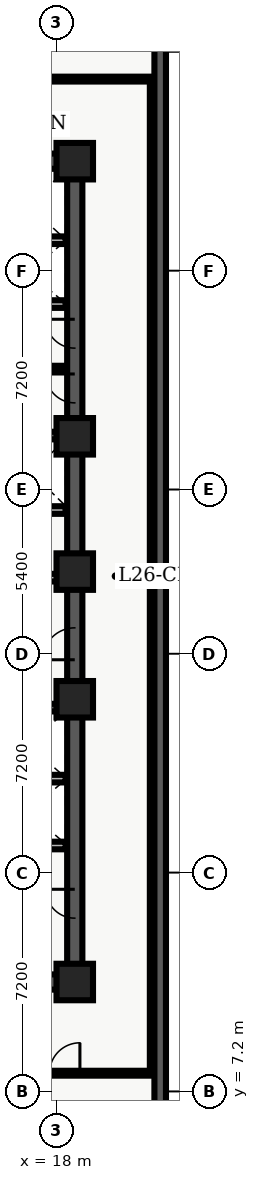
"""IFC4 building model, lengths in metres.
Left out: names, types, materials, properties, quantities, classifications, styles, units other than length and angle.
Written with IfcOpenShell. Run it as: python <this file> out.ifc"""

import sys

from ifc_helpers import new_model, entity, si_unit, converted_unit, direction, frame, origin_with_axes, origin_2d_with_axis, place, context, subcontext, project, spatial, polyline, rectangle, outline, extrude, element, fill, save


model = new_model("IFC4")
c1 = context("Model", 3, precision=1e-05, world=origin_with_axes(), true_north=direction((0.0, 1.0)))
c2 = subcontext(c1, "Body", "Model", "MODEL_VIEW")
j1 = project(units=[si_unit("LENGTHUNIT", "METRE"), converted_unit("PLANEANGLEUNIT", "DEGREE", entity("IfcPlaneAngleMeasure", 0.017), si_unit("PLANEANGLEUNIT", "RADIAN"), dimensions=[0, 0, 0, 0, 0, 0, 0])], contexts=[c1])
p1 = place(None, origin_with_axes())
s1 = spatial("IfcSite", under=j1, at=p1, CompositionType="ELEMENT")
p2 = place(p1, origin_with_axes())
s2 = spatial("IfcBuilding", under=s1, at=p2, CompositionType="ELEMENT")
p3 = place(p2, frame((0.0, 0.0, 108.6), z_axis=(0.0, 0.0, 1.0), x_axis=(1.0, 0.0, 0.0)))
s3 = spatial("IfcBuildingStorey", under=s2, at=p3, CompositionType="ELEMENT", Elevation=108.6)
p4 = place(p3, frame((11.4, 10.8, 0.0), z_axis=(0.0, 0.0, 1.0), x_axis=(1.0, 0.0, 0.0)))
e1 = element("IfcWall", 1, at=p4, inside=s3, PredefinedType="SHEAR", context=c2, shape_type="SweptSolid", body=[
    extrude(outline(polyline([(0.0, -0.25), (7.2, -0.25), (7.2, 0.25), (0.0, 0.25), (0.0, -0.25)])), origin_with_axes(), (0.0, 0.0, 1.0), 3.66),
])
p5 = place(p4, frame((2.625, 0.0, 0.0), z_axis=(0.0, 0.0, 1.0), x_axis=(1.0, 0.0, 0.0)))
e2 = element("IfcOpeningElement", 2, at=p5, cuts=e1, PredefinedType="OPENING", context=c2, shape_type="SweptSolid", body=[
    extrude(rectangle(XDim=1.05, YDim=0.52, at=origin_2d_with_axis()), origin_with_axes(), (0.0, 0.0, 1.0), 2.15),
])
p6 = place(p3, frame((11.4, 37.8, 0.0), z_axis=(0.0, 0.0, 1.0), x_axis=(1.0, 0.0, 0.0)))
e3 = element("IfcWall", 3, at=p6, inside=s3, PredefinedType="SHEAR", context=c2, shape_type="SweptSolid", body=[
    extrude(outline(polyline([(0.0, -0.25), (7.2, -0.25), (7.2, 0.25), (0.0, 0.25), (0.0, -0.25)])), origin_with_axes(), (0.0, 0.0, 1.0), 3.66),
])
p7 = place(p6, frame((2.625, 0.0, 0.0), z_axis=(0.0, 0.0, 1.0), x_axis=(1.0, 0.0, 0.0)))
e4 = element("IfcOpeningElement", 4, at=p7, cuts=e3, PredefinedType="OPENING", context=c2, shape_type="SweptSolid", body=[
    extrude(rectangle(XDim=1.05, YDim=0.52, at=origin_2d_with_axis()), origin_with_axes(), (0.0, 0.0, 1.0), 2.15),
])
p8 = place(p3, frame((18.6, 10.8, 0.0), z_axis=(0.0, 0.0, 1.0), x_axis=(0.0, 1.0, 0.0)))
e5 = element("IfcWall", 5, at=p8, inside=s3, PredefinedType="SHEAR", context=c2, shape_type="SweptSolid", body=[
    extrude(outline(polyline([(0.0, -0.25), (13.5, -0.25), (13.5, 0.25), (0.0, 0.25), (0.0, -0.25)])), origin_with_axes(), (0.0, 0.0, 1.0), 3.66),
])
p9 = place(p8, frame((11.125, 0.0, 0.0), z_axis=(0.0, 0.0, 1.0), x_axis=(1.0, 0.0, 0.0)))
e6 = element("IfcOpeningElement", 6, at=p9, cuts=e5, PredefinedType="OPENING", context=c2, shape_type="SweptSolid", body=[
    extrude(rectangle(XDim=1.05, YDim=0.52, at=origin_2d_with_axis()), origin_with_axes(), (0.0, 0.0, 1.0), 2.15),
])
p10 = place(p8, frame((2.575, 0.0, 0.0), z_axis=(0.0, 0.0, 1.0), x_axis=(1.0, 0.0, 0.0)))
e7 = element("IfcOpeningElement", 7, at=p10, cuts=e5, PredefinedType="OPENING", context=c2, shape_type="SweptSolid", body=[
    extrude(rectangle(XDim=0.95, YDim=0.52, at=origin_2d_with_axis()), origin_with_axes(), (0.0, 0.0, 1.0), 2.15),
])
p11 = place(p3, frame((18.6, 24.3, 0.0), z_axis=(0.0, 0.0, 1.0), x_axis=(0.0, 1.0, 0.0)))
e8 = element("IfcWall", 8, at=p11, inside=s3, PredefinedType="SHEAR", context=c2, shape_type="SweptSolid", body=[
    extrude(outline(polyline([(0.0, -0.25), (13.5, -0.25), (13.5, 0.25), (0.0, 0.25), (0.0, -0.25)])), origin_with_axes(), (0.0, 0.0, 1.0), 3.66),
])
p12 = place(p11, frame((6.025, 0.0, 0.0), z_axis=(0.0, 0.0, 1.0), x_axis=(1.0, 0.0, 0.0)))
e9 = element("IfcOpeningElement", 9, at=p12, cuts=e8, PredefinedType="OPENING", context=c2, shape_type="SweptSolid", body=[
    extrude(rectangle(XDim=0.95, YDim=0.52, at=origin_2d_with_axis()), origin_with_axes(), (0.0, 0.0, 1.0), 2.15),
])
p13 = place(p11, frame((7.825, 0.0, 0.0), z_axis=(0.0, 0.0, 1.0), x_axis=(1.0, 0.0, 0.0)))
e10 = element("IfcOpeningElement", 10, at=p13, cuts=e8, PredefinedType="OPENING", context=c2, shape_type="SweptSolid", body=[
    extrude(rectangle(XDim=0.95, YDim=0.52, at=origin_2d_with_axis()), origin_with_axes(), (0.0, 0.0, 1.0), 2.15),
])
for number, where, z_axis, x_axis in (
    (11, (11.65, 19.825, 0.0), (0.0, 0.0, 1.0), (1.0, 0.0, 0.0)),
    (12, (11.65, 28.775, 0.0), (0.0, 0.0, 1.0), (1.0, 0.0, 0.0)),
):
    element("IfcWall", number, at=place(p3, frame(where, z_axis=z_axis, x_axis=x_axis)), inside=s3, PredefinedType="SHEAR", context=c2, shape_type="SweptSolid", body=[
        extrude(outline(polyline([(0.0, -0.125), (6.7, -0.125), (6.7, 0.125), (0.0, 0.125), (0.0, -0.125)])), origin_with_axes(), (0.0, 0.0, 1.0), 3.66),
    ])
p14 = place(p3, frame((11.7, 24.1, 0.0), z_axis=(0.0, 0.0, 1.0), x_axis=(1.0, 0.0, 0.0)))
e13 = element("IfcWall", 13, at=p14, inside=s3, PredefinedType="SOLIDWALL", context=c2, shape_type="SweptSolid", body=[
    extrude(outline(polyline([(0.0, -0.125), (6.6, -0.125), (6.6, 0.125), (0.0, 0.125), (0.0, -0.125)])), origin_with_axes(), (0.0, 0.0, 1.0), 2.7),
])
p15 = place(p14, frame((3.6, 0.0, 0.0), z_axis=(0.0, 0.0, 1.0), x_axis=(1.0, 0.0, 0.0)))
e14 = element("IfcOpeningElement", 14, at=p15, cuts=e13, PredefinedType="OPENING", context=c2, shape_type="SweptSolid", body=[
    extrude(rectangle(XDim=0.9, YDim=0.27, at=origin_2d_with_axis()), origin_with_axes(), (0.0, 0.0, 1.0), 2.15),
])
p16 = place(p14, frame((5.65, 0.0, 0.0), z_axis=(0.0, 0.0, 1.0), x_axis=(1.0, 0.0, 0.0)))
e15 = element("IfcOpeningElement", 15, at=p16, cuts=e13, PredefinedType="OPENING", context=c2, shape_type="SweptSolid", body=[
    extrude(rectangle(XDim=0.9, YDim=0.27, at=origin_2d_with_axis()), origin_with_axes(), (0.0, 0.0, 1.0), 2.15),
])
p17 = place(p3, frame((11.7, 26.325, 0.0), z_axis=(0.0, 0.0, 1.0), x_axis=(1.0, 0.0, 0.0)))
e16 = element("IfcWall", 16, at=p17, inside=s3, PredefinedType="SOLIDWALL", context=c2, shape_type="SweptSolid", body=[
    extrude(outline(polyline([(0.0, -0.125), (6.6, -0.125), (6.6, 0.125), (0.0, 0.125), (0.0, -0.125)])), origin_with_axes(), (0.0, 0.0, 1.0), 2.7),
])
p18 = place(p17, frame((3.5, 0.0, 0.0), z_axis=(0.0, 0.0, 1.0), x_axis=(1.0, 0.0, 0.0)))
e17 = element("IfcOpeningElement", 17, at=p18, cuts=e16, PredefinedType="OPENING", context=c2, shape_type="SweptSolid", body=[
    extrude(rectangle(XDim=0.9, YDim=0.27, at=origin_2d_with_axis()), origin_with_axes(), (0.0, 0.0, 1.0), 2.15),
])
for number, where, z_axis, x_axis in (
    (18, (18.6, 10.8, 0.0), (0.0, 0.0, 1.0), (1.0, 0.0, 0.0)),
    (19, (18.6, 20.1, 0.0), (0.0, 0.0, 1.0), (1.0, 0.0, 0.0)),
    (20, (18.6, 24.3, 0.0), (0.0, 0.0, 1.0), (1.0, 0.0, 0.0)),
    (21, (18.6, 28.75, 0.0), (0.0, 0.0, 1.0), (1.0, 0.0, 0.0)),
    (22, (18.6, 37.8, 0.0), (0.0, 0.0, 1.0), (1.0, 0.0, 0.0)),
):
    element("IfcColumn", number, at=place(p3, frame(where, z_axis=z_axis, x_axis=x_axis)), inside=s3, PredefinedType="COLUMN", context=c2, shape_type="SweptSolid", body=[
        extrude(rectangle(XDim=1.2, YDim=1.2, at=origin_2d_with_axis()), origin_with_axes(), (0.0, 0.0, 1.0), 3.9),
    ])
for number, where, z_axis, x_axis in (
    (23, (15.84, 15.29, 0.0), (0.0, 0.0, 1.0), (1.0, 0.0, 0.0)),
    (24, (15.84, 17.49, 0.0), (0.0, 0.0, 1.0), (1.0, 0.0, 0.0)),
    (25, (15.84, 33.1, 0.0), (0.0, 0.0, 1.0), (1.0, 0.0, 0.0)),
    (26, (15.84, 35.2, 0.0), (0.0, 0.0, 1.0), (1.0, 0.0, 0.0)),
):
    element("IfcWall", number, at=place(p3, frame(where, z_axis=z_axis, x_axis=x_axis)), inside=s3, PredefinedType="SOLIDWALL", context=c2, shape_type="SweptSolid", body=[
        extrude(outline(polyline([(0.0, -0.125), (2.46, -0.125), (2.46, 0.125), (0.0, 0.125), (0.0, -0.125)])), origin_with_axes(), (0.0, 0.0, 1.0), 2.7),
    ])
p19 = place(p3, frame((15.84, 31.0, 0.0), z_axis=(0.0, 0.0, 1.0), x_axis=(1.0, 0.0, 0.0)))
e27 = element("IfcWall", 27, at=p19, inside=s3, PredefinedType="PARTITIONING", context=c2, shape_type="SweptSolid", body=[
    extrude(outline(polyline([(0.0, -0.07), (2.46, -0.07), (2.46, 0.07), (0.0, 0.07), (0.0, -0.07)])), origin_with_axes(), (0.0, 0.0, 1.0), 2.7),
])
p20 = place(p3, frame((2.6, 7.8, 0.0), z_axis=(0.0, 0.0, 1.0), x_axis=(1.0, 0.0, 0.0)))
e28 = element("IfcWall", 28, at=p20, inside=s3, PredefinedType="PARTITIONING", context=c2, shape_type="SweptSolid", body=[
    extrude(outline(polyline([(0.0, -0.08), (18.625, -0.08), (18.625, 0.08), (0.0, 0.08), (0.0, -0.08)])), origin_with_axes(), (0.0, 0.0, 1.0), 2.7),
])
p21 = place(p20, frame((6.975, 0.0, 0.0), z_axis=(0.0, 0.0, 1.0), x_axis=(1.0, 0.0, 0.0)))
e29 = element("IfcOpeningElement", 29, at=p21, cuts=e28, PredefinedType="OPENING", context=c2, shape_type="SweptSolid", body=[
    extrude(rectangle(XDim=1.2, YDim=0.18, at=origin_2d_with_axis()), origin_with_axes(), (0.0, 0.0, 1.0), 2.2),
])
p22 = place(p20, frame((15.669, 0.0, 0.0), z_axis=(0.0, 0.0, 1.0), x_axis=(1.0, 0.0, 0.0)))
e30 = element("IfcOpeningElement", 30, at=p22, cuts=e28, PredefinedType="OPENING", context=c2, shape_type="SweptSolid", body=[
    extrude(rectangle(XDim=1.0, YDim=0.18, at=origin_2d_with_axis()), origin_with_axes(), (0.0, 0.0, 1.0), 2.15),
])
p23 = place(p3, frame((2.6, 40.5, 0.0), z_axis=(0.0, 0.0, 1.0), x_axis=(1.0, 0.0, 0.0)))
e31 = element("IfcWall", 31, at=p23, inside=s3, PredefinedType="PARTITIONING", context=c2, shape_type="SweptSolid", body=[
    extrude(outline(polyline([(0.0, -0.08), (18.65, -0.08), (18.65, 0.08), (0.0, 0.08), (0.0, -0.08)])), origin_with_axes(), (0.0, 0.0, 1.0), 2.7),
])
p24 = place(p23, frame((2.283, 0.0, 0.0), z_axis=(0.0, 0.0, 1.0), x_axis=(1.0, 0.0, 0.0)))
e32 = element("IfcOpeningElement", 32, at=p24, cuts=e31, PredefinedType="OPENING", context=c2, shape_type="SweptSolid", body=[
    extrude(rectangle(XDim=1.0, YDim=0.18, at=origin_2d_with_axis()), origin_with_axes(), (0.0, 0.0, 1.0), 2.15),
])
p25 = place(p23, frame((7.769, 0.0, 0.0), z_axis=(0.0, 0.0, 1.0), x_axis=(1.0, 0.0, 0.0)))
e33 = element("IfcOpeningElement", 33, at=p25, cuts=e31, PredefinedType="OPENING", context=c2, shape_type="SweptSolid", body=[
    extrude(rectangle(XDim=1.0, YDim=0.18, at=origin_2d_with_axis()), origin_with_axes(), (0.0, 0.0, 1.0), 2.15),
])
p26 = place(p23, frame((13.132, 0.0, 0.0), z_axis=(0.0, 0.0, 1.0), x_axis=(1.0, 0.0, 0.0)))
e34 = element("IfcOpeningElement", 34, at=p26, cuts=e31, PredefinedType="OPENING", context=c2, shape_type="SweptSolid", body=[
    extrude(rectangle(XDim=1.0, YDim=0.18, at=origin_2d_with_axis()), origin_with_axes(), (0.0, 0.0, 1.0), 2.15),
])
p27 = place(p3, frame((21.15, 7.8, 0.0), z_axis=(0.0, 0.0, 1.0), x_axis=(0.0, 1.0, 0.0)))
e35 = element("IfcWall", 35, at=p27, inside=s3, PredefinedType="PARTITIONING", context=c2, shape_type="SweptSolid", body=[
    extrude(outline(polyline([(0.0, -0.08), (32.7, -0.08), (32.7, 0.08), (0.0, 0.08), (0.0, -0.08)])), origin_with_axes(), (0.0, 0.0, 1.0), 2.7),
])
p28 = place(p3, frame((21.41, 45.82, 0.0), z_axis=(0.0, 0.0, 1.0), x_axis=(0.0, -1.0, 0.0)))
e36 = element("IfcWall", 36, at=p28, inside=s3, PredefinedType="SOLIDWALL", context=c2, shape_type="SweptSolid", body=[
    extrude(outline(polyline([(0.0, -0.19), (45.82, -0.19), (45.82, 0.19), (0.0, 0.19), (0.0, -0.19)])), origin_with_axes(), (0.0, 0.0, 1.0), 3.66),
])
p29 = place(p28, frame((3.079, 0.0, 0.45), z_axis=(0.0, 0.0, 1.0), x_axis=(1.0, 0.0, 0.0)))
e37 = element("IfcOpeningElement", 37, at=p29, cuts=e36, PredefinedType="OPENING", context=c2, shape_type="SweptSolid", body=[
    extrude(rectangle(XDim=2.1, YDim=0.4, at=origin_2d_with_axis()), origin_with_axes(), (0.0, 0.0, 1.0), 2.2),
])
p30 = place(p28, frame((42.741, 0.0, 0.45), z_axis=(0.0, 0.0, 1.0), x_axis=(1.0, 0.0, 0.0)))
e38 = element("IfcOpeningElement", 38, at=p30, cuts=e36, PredefinedType="OPENING", context=c2, shape_type="SweptSolid", body=[
    extrude(rectangle(XDim=2.1, YDim=0.4, at=origin_2d_with_axis()), origin_with_axes(), (0.0, 0.0, 1.0), 2.2),
])
p31 = place(p8, frame((11.125, 0.0, 0.0), z_axis=(0.0, 0.0, 1.0), x_axis=(1.0, 0.0, 0.0)))
e39 = element("IfcDoor", 39, at=p31, inside=s3, OperationType="SINGLE_SWING_LEFT", PredefinedType="DOOR", context=c2, shape_type="SweptSolid", body=[
    extrude(rectangle(XDim=1.05, YDim=0.09, at=origin_2d_with_axis()), origin_with_axes(), (0.0, 0.0, 1.0), 2.15),
])
fill(e6, e39)
p32 = place(p8, frame((2.575, 0.0, 0.0), z_axis=(0.0, 0.0, 1.0), x_axis=(1.0, 0.0, 0.0)))
e40 = element("IfcDoor", 40, at=p32, inside=s3, OperationType="SINGLE_SWING_RIGHT", PredefinedType="DOOR", context=c2, shape_type="SweptSolid", body=[
    extrude(rectangle(XDim=0.95, YDim=0.09, at=origin_2d_with_axis()), origin_with_axes(), (0.0, 0.0, 1.0), 2.15),
])
fill(e7, e40)
p33 = place(p11, frame((6.025, 0.0, 0.0), z_axis=(0.0, 0.0, 1.0), x_axis=(1.0, 0.0, 0.0)))
e41 = element("IfcDoor", 41, at=p33, inside=s3, OperationType="SINGLE_SWING_RIGHT", PredefinedType="DOOR", context=c2, shape_type="SweptSolid", body=[
    extrude(rectangle(XDim=0.95, YDim=0.09, at=origin_2d_with_axis()), origin_with_axes(), (0.0, 0.0, 1.0), 2.15),
])
fill(e9, e41)
p34 = place(p11, frame((7.825, 0.0, 0.0), z_axis=(0.0, 0.0, 1.0), x_axis=(1.0, 0.0, 0.0)))
e42 = element("IfcDoor", 42, at=p34, inside=s3, OperationType="SINGLE_SWING_RIGHT", PredefinedType="DOOR", context=c2, shape_type="SweptSolid", body=[
    extrude(rectangle(XDim=0.95, YDim=0.09, at=origin_2d_with_axis()), origin_with_axes(), (0.0, 0.0, 1.0), 2.15),
])
fill(e10, e42)
p35 = place(p20, frame((15.669, 0.0, 0.0), z_axis=(0.0, 0.0, 1.0), x_axis=(1.0, 0.0, 0.0)))
e43 = element("IfcDoor", 43, at=p35, inside=s3, OperationType="SINGLE_SWING_RIGHT", PredefinedType="DOOR", context=c2, shape_type="SweptSolid", body=[
    extrude(rectangle(XDim=1.0, YDim=0.09, at=origin_2d_with_axis()), origin_with_axes(), (0.0, 0.0, 1.0), 2.15),
])
fill(e30, e43)
save(model, sys.argv[1])
